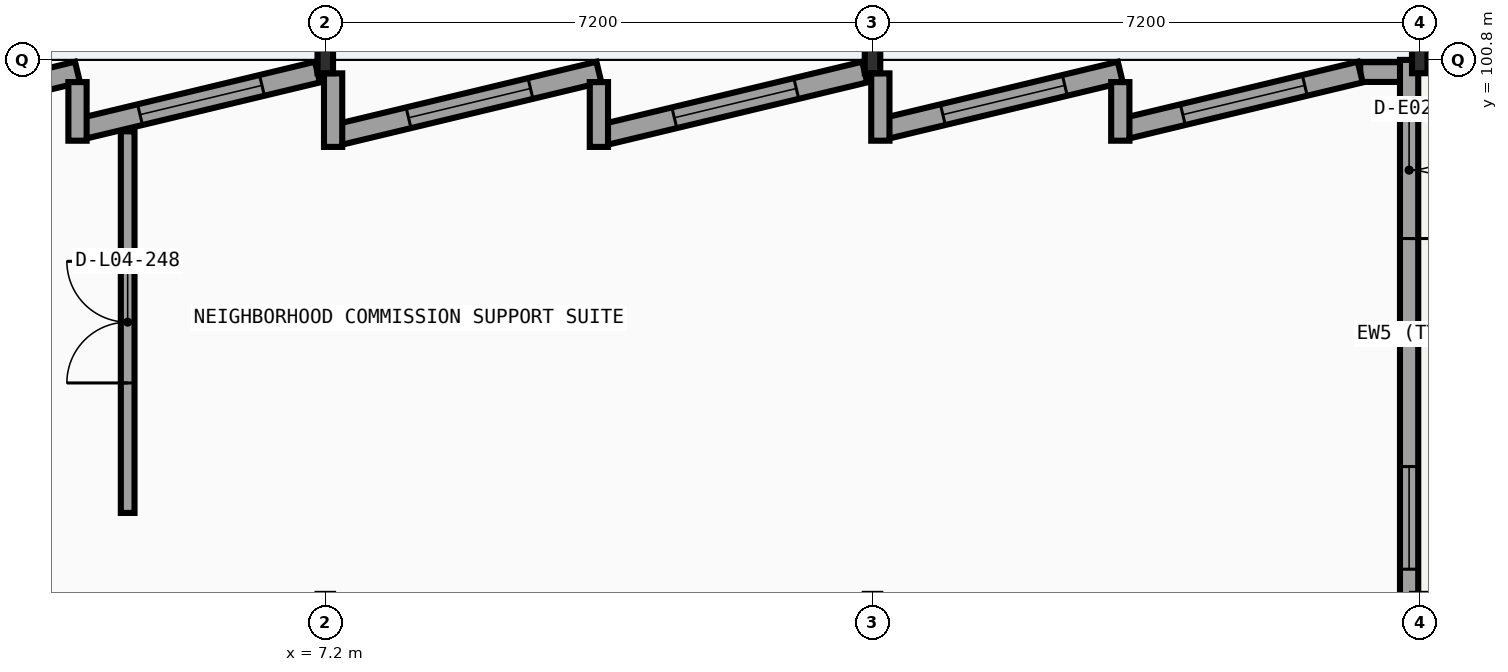
"""IFC4 building model, lengths in metres.
Left out: names, types, materials, properties, quantities, classifications, styles, units other than length and angle.
Written with IfcOpenShell. Run it as: python <this file> out.ifc"""

import sys

from ifc_helpers import new_model, si_unit, direction, frame, frame_2d, origin, origin_2d, place, context, subcontext, project, spatial, rectangle, i_section, extrude, element, fill, save


model = new_model("IFC4")
c1 = context("Model", 3, precision=1e-05, world=origin(), true_north=direction((0.0, 1.0)))
c2 = subcontext(c1, "Body", "Model", "MODEL_VIEW")
j1 = project(units=[si_unit("LENGTHUNIT", "METRE"), si_unit("PLANEANGLEUNIT", "RADIAN")], contexts=[c1])
p1 = place(None, origin())
s1 = spatial("IfcSite", under=j1, at=p1, CompositionType="ELEMENT")
p2 = place(p1, origin())
s2 = spatial("IfcBuilding", under=s1, at=p2, CompositionType="ELEMENT")
p3 = place(p2, frame((0.0, 0.0, 18.9)))
s3 = spatial("IfcBuildingStorey", under=s2, at=p3, CompositionType="ELEMENT", Elevation=18.9)
for number, where, z_axis, x_axis in (
    (1, (7.2, 100.8, 0.0), (0.0, 0.0, 1.0), (1.0, 0.0, 0.0)),
    (2, (14.4, 100.8, 0.0), (0.0, 0.0, 1.0), (1.0, 0.0, 0.0)),
    (3, (21.6, 100.8, 0.0), (0.0, 0.0, 1.0), (1.0, 0.0, 0.0)),
):
    element("IfcColumn", number, at=place(p3, frame(where, z_axis=z_axis, x_axis=x_axis)), inside=s3, PredefinedType="COLUMN", context=c2, shape_type="SweptSolid", body=[
        extrude(i_section(OverallWidth=0.204, OverallDepth=0.35, WebThickness=0.009, FlangeThickness=0.015, FilletRadius=0.015, at=origin_2d()), origin(), (0.0, 0.0, 1.0), 4.05),
    ])
p4 = place(p3, frame((0.875, 99.904, 0.0), z_axis=(0.0, 0.0, 1.0), x_axis=(0.972378159778, 0.233411041699, 0.0)))
e4 = element("IfcWall", 4, at=p4, inside=s3, PredefinedType="SOLIDWALL", context=c2, shape_type="SweptSolid", body=[
    extrude(rectangle(XDim=3.152, YDim=0.28, at=frame_2d((1.576, 0.0))), origin(), (0.0, 0.0, 1.0), 3.216),
])
p5 = place(p4, frame((0.751, 0.0, 0.8)))
e5 = element("IfcOpeningElement", 5, at=p5, cuts=e4, PredefinedType="OPENING", context=c2, shape_type="SweptSolid", body=[
    extrude(rectangle(XDim=1.65, YDim=1.9, at=frame_2d((0.825, 0.95))), frame((0.0, 0.15, 0.0), z_axis=(0.0, -1.0, 0.0), x_axis=(1.0, 0.0, 0.0)), (0.0, 0.0, 1.0), 0.3),
])
p6 = place(p3, frame((4.032, 99.904, 0.0), z_axis=(0.0, 0.0, 1.0), x_axis=(0.972378159778, 0.233411041699, 0.0)))
e6 = element("IfcWall", 6, at=p6, inside=s3, PredefinedType="SOLIDWALL", context=c2, shape_type="SweptSolid", body=[
    extrude(rectangle(XDim=3.152, YDim=0.28, at=frame_2d((1.576, 0.0))), origin(), (0.0, 0.0, 1.0), 3.216),
])
p7 = place(p6, frame((0.751, 0.0, 0.8)))
e7 = element("IfcOpeningElement", 7, at=p7, cuts=e6, PredefinedType="OPENING", context=c2, shape_type="SweptSolid", body=[
    extrude(rectangle(XDim=1.65, YDim=1.9, at=frame_2d((0.825, 0.95))), frame((0.0, 0.15, 0.0), z_axis=(0.0, -1.0, 0.0), x_axis=(1.0, 0.0, 0.0)), (0.0, 0.0, 1.0), 0.3),
])
p8 = place(p3, frame((3.94, 99.737, 0.0), z_axis=(0.0, 0.0, 1.0), x_axis=(0.0, 1.0, 0.0)))
e8 = element("IfcWall", 8, at=p8, inside=s3, PredefinedType="SOLIDWALL", context=c2, shape_type="SweptSolid", body=[
    extrude(rectangle(XDim=0.771, YDim=0.24, at=frame_2d((0.385, 0.0))), origin(), (0.0, 0.0, 1.0), 3.8),
])
p9 = place(p3, frame((7.396, 99.823, 0.0), z_axis=(0.0, 0.0, 1.0), x_axis=(0.972368310583, 0.233452069117, 0.0)))
e9 = element("IfcWall", 9, at=p9, inside=s3, PredefinedType="SOLIDWALL", context=c2, shape_type="SweptSolid", body=[
    extrude(rectangle(XDim=3.501, YDim=0.28, at=frame_2d((1.75, 0.0))), origin(), (0.0, 0.0, 1.0), 3.206),
])
p10 = place(p9, frame((0.926, 0.0, 0.8)))
e10 = element("IfcOpeningElement", 10, at=p10, cuts=e9, PredefinedType="OPENING", context=c2, shape_type="SweptSolid", body=[
    extrude(rectangle(XDim=1.65, YDim=1.9, at=frame_2d((0.825, 0.95))), frame((0.0, 0.15, 0.0), z_axis=(0.0, -1.0, 0.0), x_axis=(1.0, 0.0, 0.0)), (0.0, 0.0, 1.0), 0.3),
])
p11 = place(p3, frame((7.303, 99.656, 0.0), z_axis=(0.0, 0.0, 1.0), x_axis=(0.0, 1.0, 0.0)))
e11 = element("IfcWall", 11, at=p11, inside=s3, PredefinedType="SOLIDWALL", context=c2, shape_type="SweptSolid", body=[
    extrude(rectangle(XDim=0.968, YDim=0.24, at=frame_2d((0.484, 0.0))), origin(), (0.0, 0.0, 1.0), 3.206),
])
p12 = place(p3, frame((10.892, 99.823, 0.0), z_axis=(0.0, 0.0, 1.0), x_axis=(0.972372110407, 0.233436241621, 0.0)))
e12 = element("IfcWall", 12, at=p12, inside=s3, PredefinedType="SOLIDWALL", context=c2, shape_type="SweptSolid", body=[
    extrude(rectangle(XDim=3.501, YDim=0.28, at=frame_2d((1.751, 0.0))), origin(), (0.0, 0.0, 1.0), 3.216),
])
p13 = place(p12, frame((0.926, 0.0, 0.8)))
e13 = element("IfcOpeningElement", 13, at=p13, cuts=e12, PredefinedType="OPENING", context=c2, shape_type="SweptSolid", body=[
    extrude(rectangle(XDim=1.65, YDim=1.9, at=frame_2d((0.825, 0.95))), frame((0.0, 0.15, 0.0), z_axis=(0.0, -1.0, 0.0), x_axis=(1.0, 0.0, 0.0)), (0.0, 0.0, 1.0), 0.3),
])
p14 = place(p3, frame((10.8, 99.656, 0.0), z_axis=(0.0, 0.0, 1.0), x_axis=(0.0, 1.0, 0.0)))
e14 = element("IfcWall", 14, at=p14, inside=s3, PredefinedType="SOLIDWALL", context=c2, shape_type="SweptSolid", body=[
    extrude(rectangle(XDim=0.853, YDim=0.24, at=frame_2d((0.426, 0.0))), origin(), (0.0, 0.0, 1.0), 3.8),
])
p15 = place(p3, frame((20.817, 100.64, 0.0), z_axis=(0.0, 0.0, 1.0), x_axis=(1.0, 0.0, 0.0)))
e15 = element("IfcWall", 15, at=p15, inside=s3, PredefinedType="SOLIDWALL", context=c2, shape_type="SweptSolid", body=[
    extrude(rectangle(XDim=0.68, YDim=0.26, at=frame_2d((0.34, 0.0))), origin(), (0.0, 0.0, 1.0), 3.216),
])
p16 = place(p3, frame((14.595, 99.904, 0.0), z_axis=(0.0, 0.0, 1.0), x_axis=(0.972378159778, 0.233411041699, 0.0)))
e16 = element("IfcWall", 16, at=p16, inside=s3, PredefinedType="SOLIDWALL", context=c2, shape_type="SweptSolid", body=[
    extrude(rectangle(XDim=3.152, YDim=0.28, at=frame_2d((1.576, 0.0))), origin(), (0.0, 0.0, 1.0), 3.206),
])
p17 = place(p16, frame((0.751, 0.0, 0.8)))
e17 = element("IfcOpeningElement", 17, at=p17, cuts=e16, PredefinedType="OPENING", context=c2, shape_type="SweptSolid", body=[
    extrude(rectangle(XDim=1.65, YDim=1.9, at=frame_2d((0.825, 0.95))), frame((0.0, 0.15, 0.0), z_axis=(0.0, -1.0, 0.0), x_axis=(1.0, 0.0, 0.0)), (0.0, 0.0, 1.0), 0.3),
])
p18 = place(p3, frame((14.503, 99.737, 0.0), z_axis=(0.0, 0.0, 1.0), x_axis=(0.0, 1.0, 0.0)))
e18 = element("IfcWall", 18, at=p18, inside=s3, PredefinedType="SOLIDWALL", context=c2, shape_type="SweptSolid", body=[
    extrude(rectangle(XDim=0.886, YDim=0.24, at=frame_2d((0.443, 0.0))), origin(), (0.0, 0.0, 1.0), 3.206),
])
p19 = place(p3, frame((17.752, 99.904, 0.0), z_axis=(0.0, 0.0, 1.0), x_axis=(0.972378159778, 0.233411041699, 0.0)))
e19 = element("IfcWall", 19, at=p19, inside=s3, PredefinedType="SOLIDWALL", context=c2, shape_type="SweptSolid", body=[
    extrude(rectangle(XDim=3.152, YDim=0.28, at=frame_2d((1.576, 0.0))), origin(), (0.0, 0.0, 1.0), 3.216),
])
p20 = place(p19, frame((0.751, 0.0, 0.8)))
e20 = element("IfcOpeningElement", 20, at=p20, cuts=e19, PredefinedType="OPENING", context=c2, shape_type="SweptSolid", body=[
    extrude(rectangle(XDim=1.65, YDim=1.9, at=frame_2d((0.825, 0.95))), frame((0.0, 0.15, 0.0), z_axis=(0.0, -1.0, 0.0), x_axis=(1.0, 0.0, 0.0)), (0.0, 0.0, 1.0), 0.3),
])
p21 = place(p3, frame((17.66, 99.737, 0.0), z_axis=(0.0, 0.0, 1.0), x_axis=(0.0, 1.0, 0.0)))
e21 = element("IfcWall", 21, at=p21, inside=s3, PredefinedType="SOLIDWALL", context=c2, shape_type="SweptSolid", body=[
    extrude(rectangle(XDim=0.771, YDim=0.24, at=frame_2d((0.385, 0.0))), origin(), (0.0, 0.0, 1.0), 3.8),
])
p22 = place(p3, frame((21.46, 100.8, 0.0), z_axis=(0.0, 0.0, 1.0), x_axis=(0.0, -1.0, 0.0)))
e22 = element("IfcWall", 22, at=p22, inside=s3, PredefinedType="SOLIDWALL", context=c2, shape_type="SweptSolid", body=[
    extrude(rectangle(XDim=7.2, YDim=0.24, at=frame_2d((3.6, 0.0))), origin(), (0.0, 0.0, 1.0), 3.208),
])
p23 = place(p22, frame((0.55, 0.0, 0.0)))
e23 = element("IfcOpeningElement", 23, at=p23, cuts=e22, PredefinedType="OPENING", context=c2, shape_type="SweptSolid", body=[
    extrude(rectangle(XDim=1.8, YDim=2.15, at=frame_2d((0.9, 1.075))), frame((0.0, 0.13, 0.0), z_axis=(0.0, -1.0, 0.0), x_axis=(1.0, 0.0, 0.0)), (0.0, 0.0, 1.0), 0.26),
])
p24 = place(p22, frame((5.35, 0.0, 0.85)))
e24 = element("IfcOpeningElement", 24, at=p24, cuts=e22, PredefinedType="OPENING", context=c2, shape_type="SweptSolid", body=[
    extrude(rectangle(XDim=1.35, YDim=1.85, at=frame_2d((0.675, 0.925))), frame((0.0, 0.13, 0.0), z_axis=(0.0, -1.0, 0.0), x_axis=(1.0, 0.0, 0.0)), (0.0, 0.0, 1.0), 0.26),
])
p25 = place(p3, frame((4.6, 94.84, 0.0), z_axis=(0.0, 0.0, 1.0), x_axis=(0.0, 1.0, 0.0)))
e25 = element("IfcWall", 25, at=p25, inside=s3, PredefinedType="PARTITIONING", context=c2, shape_type="SweptSolid", body=[
    extrude(rectangle(XDim=5.02, YDim=0.18, at=frame_2d((2.51, 0.0))), origin(), (0.0, 0.0, 1.0), 3.538),
])
p26 = place(p25, frame((1.71, 0.0, 0.0)))
e26 = element("IfcOpeningElement", 26, at=p26, cuts=e25, PredefinedType="OPENING", context=c2, shape_type="SweptSolid", body=[
    extrude(rectangle(XDim=1.6, YDim=2.1, at=frame_2d((0.8, 1.05))), frame((0.0, 0.1, 0.0), z_axis=(0.0, -1.0, 0.0), x_axis=(1.0, 0.0, 0.0)), (0.0, 0.0, 1.0), 0.2),
])
p27 = place(p7, origin())
e27 = element("IfcWindow", 27, at=p27, inside=s3, PartitioningType="SINGLE_PANEL", PredefinedType="WINDOW", context=c2, shape_type="SweptSolid", body=[
    extrude(rectangle(XDim=1.65, YDim=1.9, at=frame_2d((0.825, 0.95))), frame((0.0, 0.03, 0.0), z_axis=(0.0, -1.0, 0.0), x_axis=(1.0, 0.0, 0.0)), (0.0, 0.0, 1.0), 0.06),
])
fill(e7, e27)
p28 = place(p10, origin())
e28 = element("IfcWindow", 28, at=p28, inside=s3, PartitioningType="SINGLE_PANEL", PredefinedType="WINDOW", context=c2, shape_type="SweptSolid", body=[
    extrude(rectangle(XDim=1.65, YDim=1.9, at=frame_2d((0.825, 0.95))), frame((0.0, 0.03, 0.0), z_axis=(0.0, -1.0, 0.0), x_axis=(1.0, 0.0, 0.0)), (0.0, 0.0, 1.0), 0.06),
])
fill(e10, e28)
p29 = place(p13, origin())
e29 = element("IfcWindow", 29, at=p29, inside=s3, PartitioningType="SINGLE_PANEL", PredefinedType="WINDOW", context=c2, shape_type="SweptSolid", body=[
    extrude(rectangle(XDim=1.65, YDim=1.9, at=frame_2d((0.825, 0.95))), frame((0.0, 0.03, 0.0), z_axis=(0.0, -1.0, 0.0), x_axis=(1.0, 0.0, 0.0)), (0.0, 0.0, 1.0), 0.06),
])
fill(e13, e29)
p30 = place(p17, origin())
e30 = element("IfcWindow", 30, at=p30, inside=s3, PartitioningType="SINGLE_PANEL", PredefinedType="WINDOW", context=c2, shape_type="SweptSolid", body=[
    extrude(rectangle(XDim=1.65, YDim=1.9, at=frame_2d((0.825, 0.95))), frame((0.0, 0.03, 0.0), z_axis=(0.0, -1.0, 0.0), x_axis=(1.0, 0.0, 0.0)), (0.0, 0.0, 1.0), 0.06),
])
fill(e17, e30)
p31 = place(p20, origin())
e31 = element("IfcWindow", 31, at=p31, inside=s3, PartitioningType="SINGLE_PANEL", PredefinedType="WINDOW", context=c2, shape_type="SweptSolid", body=[
    extrude(rectangle(XDim=1.65, YDim=1.9, at=frame_2d((0.825, 0.95))), frame((0.0, 0.03, 0.0), z_axis=(0.0, -1.0, 0.0), x_axis=(1.0, 0.0, 0.0)), (0.0, 0.0, 1.0), 0.06),
])
fill(e20, e31)
p32 = place(p23, origin())
e32 = element("IfcDoor", 32, at=p32, inside=s3, OperationType="DOUBLE_DOOR_SINGLE_SWING", PredefinedType="DOOR", context=c2, shape_type="SweptSolid", body=[
    extrude(rectangle(XDim=1.8, YDim=2.15, at=frame_2d((0.9, 1.075))), frame((0.0, 0.025, 0.0), z_axis=(0.0, -1.0, 0.0), x_axis=(1.0, 0.0, 0.0)), (0.0, 0.0, 1.0), 0.05),
])
fill(e23, e32)
p33 = place(p24, origin())
e33 = element("IfcWindow", 33, at=p33, inside=s3, PartitioningType="SINGLE_PANEL", PredefinedType="WINDOW", context=c2, shape_type="SweptSolid", body=[
    extrude(rectangle(XDim=1.35, YDim=1.85, at=frame_2d((0.675, 0.925))), frame((0.0, 0.03, 0.0), z_axis=(0.0, -1.0, 0.0), x_axis=(1.0, 0.0, 0.0)), (0.0, 0.0, 1.0), 0.06),
])
fill(e24, e33)
p34 = place(p26, origin())
e34 = element("IfcDoor", 34, at=p34, inside=s3, OperationType="DOUBLE_DOOR_SINGLE_SWING", PredefinedType="DOOR", context=c2, shape_type="SweptSolid", body=[
    extrude(rectangle(XDim=1.6, YDim=2.1, at=frame_2d((0.8, 1.05))), frame((0.0, 0.025, 0.0), z_axis=(0.0, -1.0, 0.0), x_axis=(1.0, 0.0, 0.0)), (0.0, 0.0, 1.0), 0.05),
])
fill(e26, e34)
save(model, sys.argv[1])
